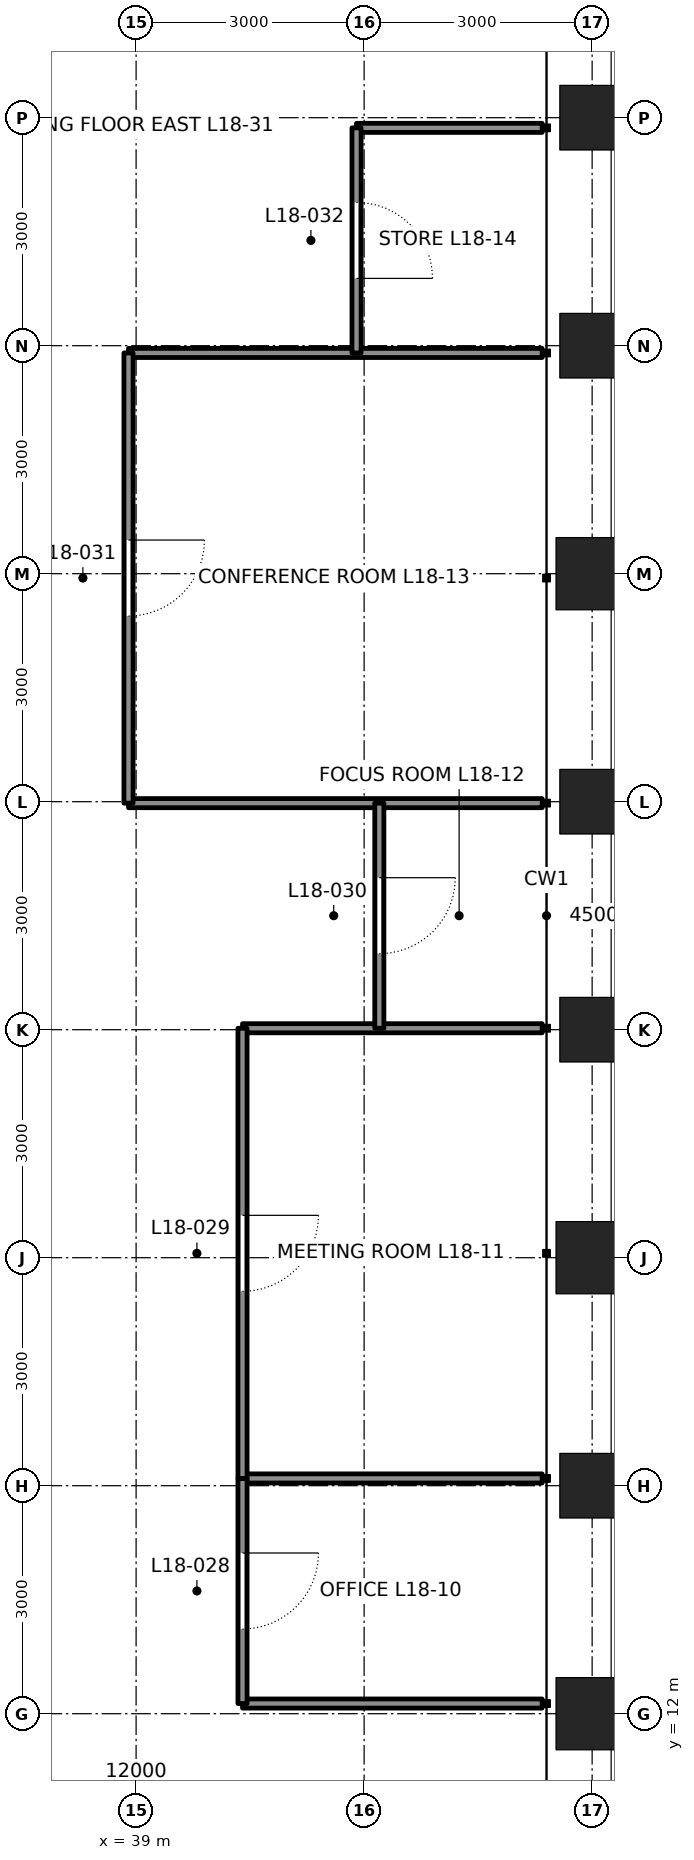
"""IFC4 building model, lengths in metres.
Left out: names, types, materials, properties, quantities, classifications, styles, units other than length and angle.
Written with IfcOpenShell. Run it as: python <this file> out.ifc"""

import sys

from ifc_helpers import new_model, si_unit, direction, frame, frame_2d, origin, origin_2d, place, context, subcontext, project, spatial, rectangle, hollow_rectangle, extrude, element, fill, save


model = new_model("IFC4")
c1 = context("Model", 3, precision=1e-05, world=origin(), true_north=direction((0.0, 1.0)))
c2 = subcontext(c1, "Body", "Model", "MODEL_VIEW")
j1 = project(units=[si_unit("LENGTHUNIT", "METRE"), si_unit("PLANEANGLEUNIT", "RADIAN")], contexts=[c1])
p1 = place(None, origin())
s1 = spatial("IfcSite", under=j1, at=p1, CompositionType="ELEMENT")
p2 = place(p1, origin())
s2 = spatial("IfcBuilding", under=s1, at=p2, CompositionType="ELEMENT")
p3 = place(p2, frame((0.0, 0.0, 87.3)))
s3 = spatial("IfcBuildingStorey", under=s2, at=p3, CompositionType="ELEMENT", Elevation=87.3)
p4 = place(p3, frame((45.0, 12.0, 0.0), z_axis=(0.0, 0.0, 1.0), x_axis=(1.0, 0.0, 0.0)))
e1 = element("IfcColumn", 1, at=p4, inside=s3, PredefinedType="COLUMN", context=c2, shape_type="SweptSolid", body=[
    extrude(hollow_rectangle(XDim=0.95, YDim=0.95, WallThickness=0.11, at=origin_2d()), origin(), (0.0, 0.0, 1.0), 4.5),
])
p5 = place(p3, frame((45.0, 15.0, 0.0), z_axis=(0.0, 0.0, 1.0), x_axis=(1.0, 0.0, 0.0)))
e2 = element("IfcColumn", 2, at=p5, inside=s3, PredefinedType="COLUMN", context=c2, shape_type="SweptSolid", body=[
    extrude(hollow_rectangle(XDim=0.85, YDim=0.85, WallThickness=0.085, at=origin_2d()), origin(), (0.0, 0.0, 1.0), 4.5),
])
p6 = place(p3, frame((45.0, 18.0, 0.0), z_axis=(0.0, 0.0, 1.0), x_axis=(1.0, 0.0, 0.0)))
e3 = element("IfcColumn", 3, at=p6, inside=s3, PredefinedType="COLUMN", context=c2, shape_type="SweptSolid", body=[
    extrude(hollow_rectangle(XDim=0.95, YDim=0.95, WallThickness=0.11, at=origin_2d()), origin(), (0.0, 0.0, 1.0), 4.5),
])
for number, where, z_axis, x_axis in (
    (4, (45.0, 21.0, 0.0), (0.0, 0.0, 1.0), (1.0, 0.0, 0.0)),
    (5, (45.0, 24.0, 0.0), (0.0, 0.0, 1.0), (1.0, 0.0, 0.0)),
):
    element("IfcColumn", number, at=place(p3, frame(where, z_axis=z_axis, x_axis=x_axis)), inside=s3, PredefinedType="COLUMN", context=c2, shape_type="SweptSolid", body=[
        extrude(hollow_rectangle(XDim=0.85, YDim=0.85, WallThickness=0.085, at=origin_2d()), origin(), (0.0, 0.0, 1.0), 4.5),
    ])
p7 = place(p3, frame((45.0, 27.0, 0.0), z_axis=(0.0, 0.0, 1.0), x_axis=(1.0, 0.0, 0.0)))
e6 = element("IfcColumn", 6, at=p7, inside=s3, PredefinedType="COLUMN", context=c2, shape_type="SweptSolid", body=[
    extrude(hollow_rectangle(XDim=0.95, YDim=0.95, WallThickness=0.11, at=origin_2d()), origin(), (0.0, 0.0, 1.0), 4.5),
])
for number, where, z_axis, x_axis in (
    (7, (45.0, 30.0, 0.0), (0.0, 0.0, 1.0), (1.0, 0.0, 0.0)),
    (8, (45.0, 33.0, 0.0), (0.0, 0.0, 1.0), (1.0, 0.0, 0.0)),
):
    element("IfcColumn", number, at=place(p3, frame(where, z_axis=z_axis, x_axis=x_axis)), inside=s3, PredefinedType="COLUMN", context=c2, shape_type="SweptSolid", body=[
        extrude(hollow_rectangle(XDim=0.85, YDim=0.85, WallThickness=0.085, at=origin_2d()), origin(), (0.0, 0.0, 1.0), 4.5),
    ])
p8 = place(p3, frame((44.343, 12.134, -0.3), z_axis=(0.0, 0.0, 1.0), x_axis=(-1.0, 0.0, 0.0)))
e9 = element("IfcWall", 9, at=p8, inside=s3, PredefinedType="PARTITIONING", context=c2, shape_type="SweptSolid", body=[
    extrude(rectangle(XDim=3.943, YDim=0.12, at=frame_2d((1.971, 0.0))), origin(), (0.0, 0.0, 1.0), 3.481),
])
for number, where, z_axis, x_axis in (
    (10, (44.343, 15.096, -0.3), (0.0, 0.0, 1.0), (-1.0, 0.0, 0.0)),
    (11, (44.343, 21.019, -0.3), (0.0, 0.0, 1.0), (-1.0, 0.0, 0.0)),
):
    element("IfcWall", number, at=place(p3, frame(where, z_axis=z_axis, x_axis=x_axis)), inside=s3, PredefinedType="PARTITIONING", context=c2, shape_type="SweptSolid", body=[
        extrude(rectangle(XDim=3.943, YDim=0.12, at=frame_2d((1.971, 0.0))), origin(), (0.0, 0.0, 1.0), 3.646),
    ])
for number, where, z_axis, x_axis in (
    (12, (44.343, 23.981, -0.3), (0.0, 0.0, 1.0), (-1.0, 0.0, 0.0)),
    (13, (44.343, 29.904, -0.3), (0.0, 0.0, 1.0), (-1.0, 0.0, 0.0)),
):
    element("IfcWall", number, at=place(p3, frame(where, z_axis=z_axis, x_axis=x_axis)), inside=s3, PredefinedType="PARTITIONING", context=c2, shape_type="SweptSolid", body=[
        extrude(rectangle(XDim=5.443, YDim=0.12, at=frame_2d((2.721, 0.0))), origin(), (0.0, 0.0, 1.0), 3.646),
    ])
p9 = place(p3, frame((44.343, 32.866, -0.3), z_axis=(0.0, 0.0, 1.0), x_axis=(-1.0, 0.0, 0.0)))
e14 = element("IfcWall", 14, at=p9, inside=s3, PredefinedType="PARTITIONING", context=c2, shape_type="SweptSolid", body=[
    extrude(rectangle(XDim=2.443, YDim=0.12, at=frame_2d((1.221, 0.0))), origin(), (0.0, 0.0, 1.0), 3.481),
])
p10 = place(p3, frame((40.4, 12.134, -0.3), z_axis=(0.0, 0.0, 1.0), x_axis=(0.0, 1.0, 0.0)))
e15 = element("IfcWall", 15, at=p10, inside=s3, PredefinedType="PARTITIONING", context=c2, shape_type="SweptSolid", body=[
    extrude(rectangle(XDim=2.962, YDim=0.12, at=frame_2d((1.481, 0.0))), origin(), (0.0, 0.0, 1.0), 4.34),
])
p11 = place(p10, frame((0.981, 0.0, 0.3)))
e16 = element("IfcOpeningElement", 16, at=p11, cuts=e15, PredefinedType="OPENING", context=c2, shape_type="SweptSolid", body=[
    extrude(rectangle(XDim=1.0, YDim=2.4, at=frame_2d((0.5, 1.2))), frame((0.0, 0.07, 0.0), z_axis=(0.0, -1.0, 0.0), x_axis=(1.0, 0.0, 0.0)), (0.0, 0.0, 1.0), 0.14),
])
p12 = place(p3, frame((40.4, 15.096, -0.3), z_axis=(0.0, 0.0, 1.0), x_axis=(0.0, 1.0, 0.0)))
e17 = element("IfcWall", 17, at=p12, inside=s3, PredefinedType="PARTITIONING", context=c2, shape_type="SweptSolid", body=[
    extrude(rectangle(XDim=5.923, YDim=0.12, at=frame_2d((2.962, 0.0))), origin(), (0.0, 0.0, 1.0), 4.34),
])
p13 = place(p12, frame((2.462, 0.0, 0.3)))
e18 = element("IfcOpeningElement", 18, at=p13, cuts=e17, PredefinedType="OPENING", context=c2, shape_type="SweptSolid", body=[
    extrude(rectangle(XDim=1.0, YDim=2.4, at=frame_2d((0.5, 1.2))), frame((0.0, 0.07, 0.0), z_axis=(0.0, -1.0, 0.0), x_axis=(1.0, 0.0, 0.0)), (0.0, 0.0, 1.0), 0.14),
])
p14 = place(p3, frame((42.2, 21.019, -0.3), z_axis=(0.0, 0.0, 1.0), x_axis=(0.0, 1.0, 0.0)))
e19 = element("IfcWall", 19, at=p14, inside=s3, PredefinedType="PARTITIONING", context=c2, shape_type="SweptSolid", body=[
    extrude(rectangle(XDim=2.962, YDim=0.12, at=frame_2d((1.481, 0.0))), origin(), (0.0, 0.0, 1.0), 4.34),
])
p15 = place(p14, frame((0.981, 0.0, 0.3)))
e20 = element("IfcOpeningElement", 20, at=p15, cuts=e19, PredefinedType="OPENING", context=c2, shape_type="SweptSolid", body=[
    extrude(rectangle(XDim=1.0, YDim=2.4, at=frame_2d((0.5, 1.2))), frame((0.0, 0.07, 0.0), z_axis=(0.0, -1.0, 0.0), x_axis=(1.0, 0.0, 0.0)), (0.0, 0.0, 1.0), 0.14),
])
p16 = place(p3, frame((38.9, 23.981, -0.3), z_axis=(0.0, 0.0, 1.0), x_axis=(0.0, 1.0, 0.0)))
e21 = element("IfcWall", 21, at=p16, inside=s3, PredefinedType="PARTITIONING", context=c2, shape_type="SweptSolid", body=[
    extrude(rectangle(XDim=5.923, YDim=0.12, at=frame_2d((2.962, 0.0))), origin(), (0.0, 0.0, 1.0), 4.34),
])
p17 = place(p16, frame((2.462, 0.0, 0.3)))
e22 = element("IfcOpeningElement", 22, at=p17, cuts=e21, PredefinedType="OPENING", context=c2, shape_type="SweptSolid", body=[
    extrude(rectangle(XDim=1.0, YDim=2.4, at=frame_2d((0.5, 1.2))), frame((0.0, 0.07, 0.0), z_axis=(0.0, -1.0, 0.0), x_axis=(1.0, 0.0, 0.0)), (0.0, 0.0, 1.0), 0.14),
])
p18 = place(p3, frame((41.9, 29.904, -0.3), z_axis=(0.0, 0.0, 1.0), x_axis=(0.0, 1.0, 0.0)))
e23 = element("IfcWall", 23, at=p18, inside=s3, PredefinedType="PARTITIONING", context=c2, shape_type="SweptSolid", body=[
    extrude(rectangle(XDim=2.962, YDim=0.12, at=frame_2d((1.481, 0.0))), origin(), (0.0, 0.0, 1.0), 4.34),
])
p19 = place(p18, frame((0.981, 0.0, 0.3)))
e24 = element("IfcOpeningElement", 24, at=p19, cuts=e23, PredefinedType="OPENING", context=c2, shape_type="SweptSolid", body=[
    extrude(rectangle(XDim=1.0, YDim=2.4, at=frame_2d((0.5, 1.2))), frame((0.0, 0.07, 0.0), z_axis=(0.0, -1.0, 0.0), x_axis=(1.0, 0.0, 0.0)), (0.0, 0.0, 1.0), 0.14),
])
p20 = place(p3, frame((34.8, 33.0, -0.3), z_axis=(0.0, 0.0, 1.0), x_axis=(0.707106781187, 0.707106781187, 0.0)))
e25 = element("IfcWall", 25, at=p20, inside=s3, PredefinedType="PARTITIONING", context=c2, shape_type="SweptSolid", body=[
    extrude(rectangle(XDim=12.944, YDim=0.12, at=frame_2d((6.472, 0.0))), origin(), (0.0, 0.0, 1.0), 4.34),
])
p21 = place(p20, frame((1.3, 0.0, 0.3)))
e26 = element("IfcOpeningElement", 26, at=p21, cuts=e25, PredefinedType="OPENING", context=c2, shape_type="SweptSolid", body=[
    extrude(rectangle(XDim=1.0, YDim=2.4, at=frame_2d((0.5, 1.2))), frame((0.0, 0.07, 0.0), z_axis=(0.0, -1.0, 0.0), x_axis=(1.0, 0.0, 0.0)), (0.0, 0.0, 1.0), 0.14),
])
p22 = place(p3, frame((34.8, 12.0, -0.3), z_axis=(0.0, 0.0, 1.0), x_axis=(0.707106781187, -0.707106781187, 0.0)))
e27 = element("IfcWall", 27, at=p22, inside=s3, PredefinedType="PARTITIONING", context=c2, shape_type="SweptSolid", body=[
    extrude(rectangle(XDim=12.944, YDim=0.12, at=frame_2d((6.472, 0.0))), origin(), (0.0, 0.0, 1.0), 4.34),
])
p23 = place(p22, frame((1.3, 0.0, 0.3)))
e28 = element("IfcOpeningElement", 28, at=p23, cuts=e27, PredefinedType="OPENING", context=c2, shape_type="SweptSolid", body=[
    extrude(rectangle(XDim=1.0, YDim=2.4, at=frame_2d((0.5, 1.2))), frame((0.0, 0.07, 0.0), z_axis=(0.0, -1.0, 0.0), x_axis=(1.0, 0.0, 0.0)), (0.0, 0.0, 1.0), 0.14),
])
p24 = place(p11, frame((1.0, 0.0, 0.0), z_axis=(0.0, 0.0, 1.0), x_axis=(-1.0, 0.0, 0.0)))
e29 = element("IfcDoor", 29, at=p24, inside=s3, OperationType="SINGLE_SWING_LEFT", PredefinedType="DOOR", context=c2, shape_type="SweptSolid", body=[
    extrude(rectangle(XDim=1.0, YDim=2.4, at=frame_2d((0.5, 1.2))), frame((0.0, 0.025, 0.0), z_axis=(0.0, -1.0, 0.0), x_axis=(1.0, 0.0, 0.0)), (0.0, 0.0, 1.0), 0.05),
])
fill(e16, e29)
p25 = place(p13, frame((1.0, 0.0, 0.0), z_axis=(0.0, 0.0, 1.0), x_axis=(-1.0, 0.0, 0.0)))
e30 = element("IfcDoor", 30, at=p25, inside=s3, OperationType="SINGLE_SWING_LEFT", PredefinedType="DOOR", context=c2, shape_type="SweptSolid", body=[
    extrude(rectangle(XDim=1.0, YDim=2.4, at=frame_2d((0.5, 1.2))), frame((0.0, 0.025, 0.0), z_axis=(0.0, -1.0, 0.0), x_axis=(1.0, 0.0, 0.0)), (0.0, 0.0, 1.0), 0.05),
])
fill(e18, e30)
p26 = place(p15, frame((1.0, 0.0, 0.0), z_axis=(0.0, 0.0, 1.0), x_axis=(-1.0, 0.0, 0.0)))
e31 = element("IfcDoor", 31, at=p26, inside=s3, OperationType="SINGLE_SWING_LEFT", PredefinedType="DOOR", context=c2, shape_type="SweptSolid", body=[
    extrude(rectangle(XDim=1.0, YDim=2.4, at=frame_2d((0.5, 1.2))), frame((0.0, 0.025, 0.0), z_axis=(0.0, -1.0, 0.0), x_axis=(1.0, 0.0, 0.0)), (0.0, 0.0, 1.0), 0.05),
])
fill(e20, e31)
p27 = place(p17, frame((1.0, 0.0, 0.0), z_axis=(0.0, 0.0, 1.0), x_axis=(-1.0, 0.0, 0.0)))
e32 = element("IfcDoor", 32, at=p27, inside=s3, OperationType="SINGLE_SWING_LEFT", PredefinedType="DOOR", context=c2, shape_type="SweptSolid", body=[
    extrude(rectangle(XDim=1.0, YDim=2.4, at=frame_2d((0.5, 1.2))), frame((0.0, 0.025, 0.0), z_axis=(0.0, -1.0, 0.0), x_axis=(1.0, 0.0, 0.0)), (0.0, 0.0, 1.0), 0.05),
])
fill(e22, e32)
p28 = place(p19, frame((1.0, 0.0, 0.0), z_axis=(0.0, 0.0, 1.0), x_axis=(-1.0, 0.0, 0.0)))
e33 = element("IfcDoor", 33, at=p28, inside=s3, OperationType="SINGLE_SWING_RIGHT", PredefinedType="DOOR", context=c2, shape_type="SweptSolid", body=[
    extrude(rectangle(XDim=1.0, YDim=2.4, at=frame_2d((0.5, 1.2))), frame((0.0, 0.025, 0.0), z_axis=(0.0, -1.0, 0.0), x_axis=(1.0, 0.0, 0.0)), (0.0, 0.0, 1.0), 0.05),
])
fill(e24, e33)
save(model, sys.argv[1])
